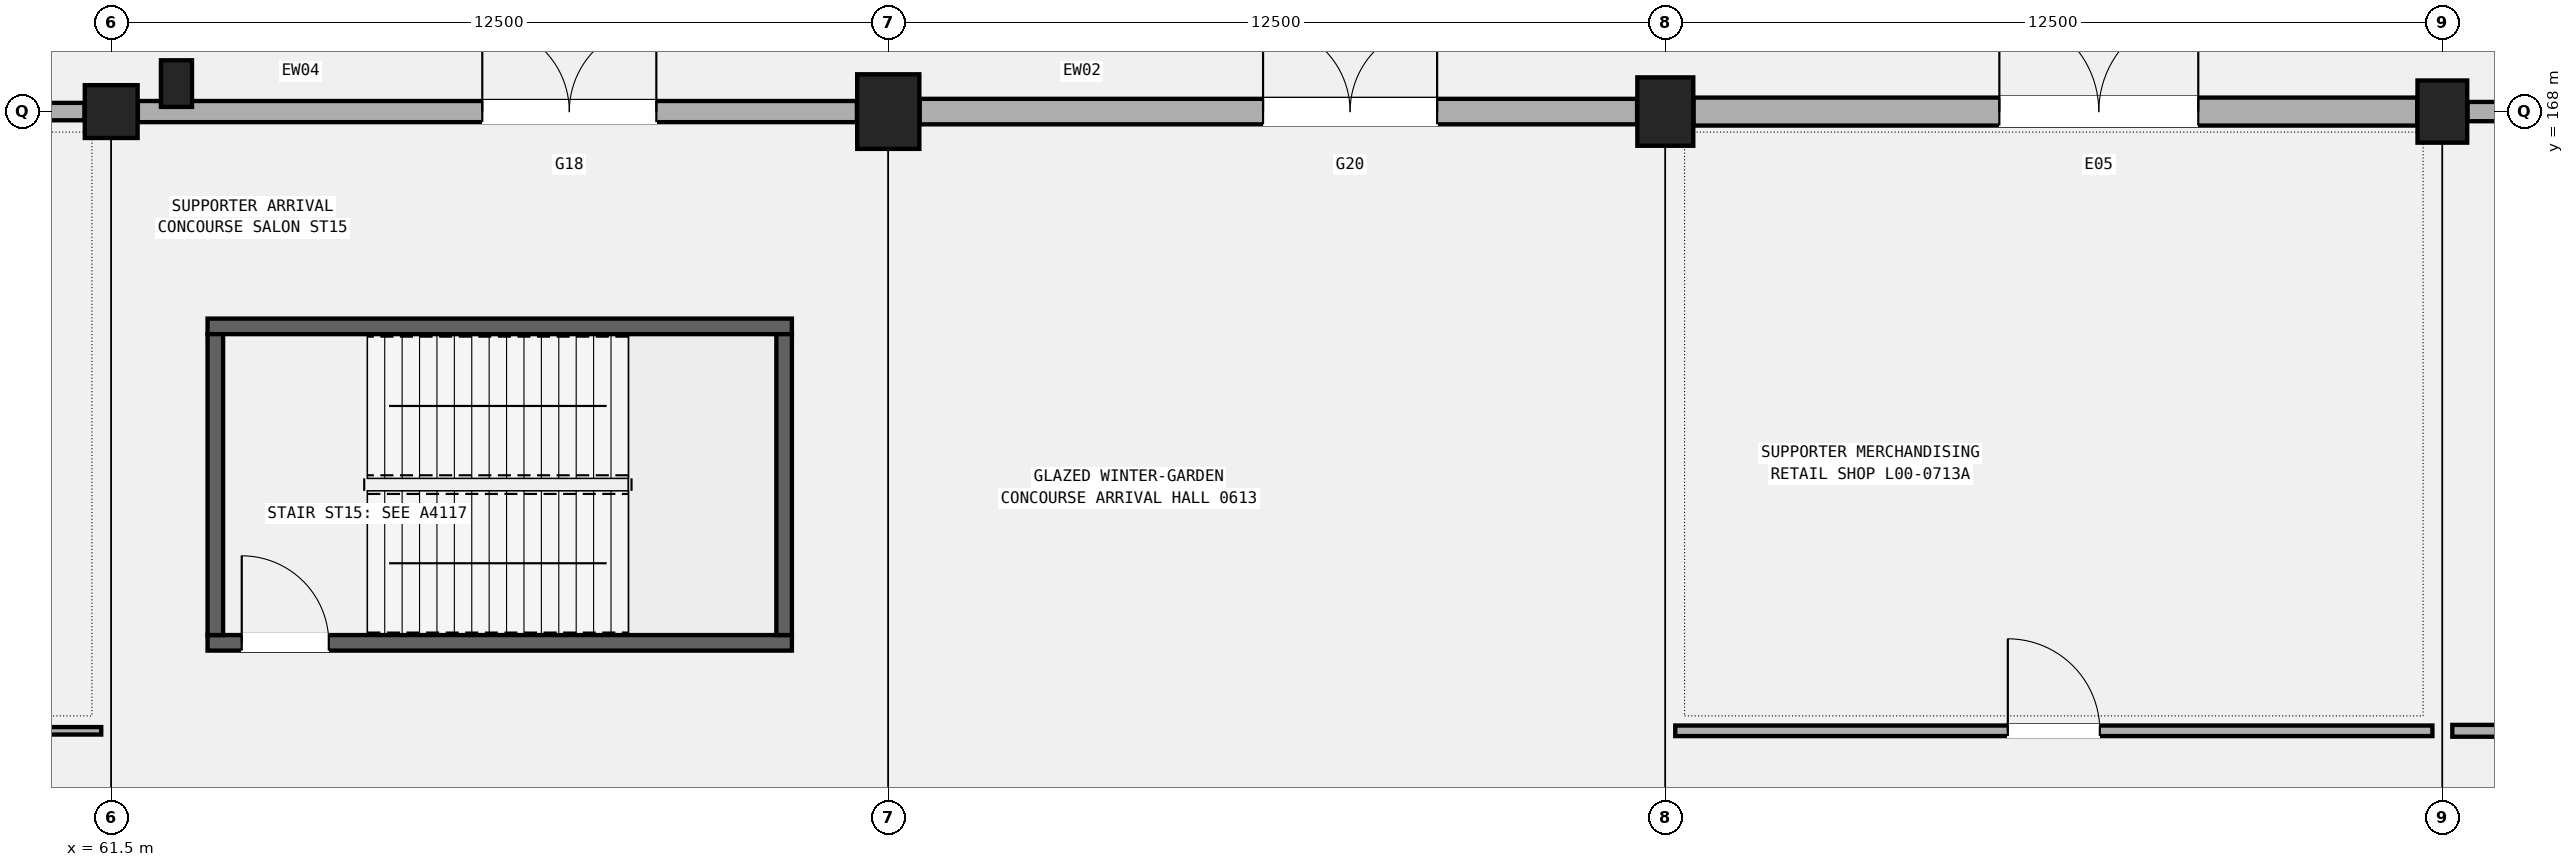
"""IFC4 building model, lengths in metres.
Left out: names, types, materials, properties, quantities, classifications, styles, units other than length and angle.
Written with IfcOpenShell. Run it as: python <this file> out.ifc"""

import sys

from ifc_helpers import new_model, si_unit, direction, frame, frame_2d, origin, origin_2d, place, context, subcontext, project, spatial, rectangle, circle, extrude, element, fill, save


model = new_model("IFC4")
c1 = context("Model", 3, precision=1e-05, world=origin(), true_north=direction((0.0, 1.0)))
c2 = subcontext(c1, "Body", "Model", "MODEL_VIEW")
j1 = project(units=[si_unit("LENGTHUNIT", "METRE"), si_unit("PLANEANGLEUNIT", "RADIAN")], contexts=[c1])
p1 = place(None, origin())
s1 = spatial("IfcSite", under=j1, at=p1, CompositionType="ELEMENT")
p2 = place(p1, origin())
s2 = spatial("IfcBuilding", under=s1, at=p2, CompositionType="ELEMENT")
p3 = place(p2, origin())
s3 = spatial("IfcBuildingStorey", under=s2, at=p3, CompositionType="ELEMENT", Elevation=0.0)
p4 = place(p3, frame((61.5, 168.0, 0.0), z_axis=(0.0, 0.0, 1.0), x_axis=(1.0, 0.0, 0.0)))
e1 = element("IfcColumn", 1, at=p4, inside=s3, PredefinedType="COLUMN", context=c2, shape_type="SweptSolid", body=[
    extrude(circle(Radius=0.425, at=origin_2d()), origin(), (0.0, 0.0, 1.0), 5.4),
])
p5 = place(p3, frame((74.0, 168.0, 0.0), z_axis=(0.0, 0.0, 1.0), x_axis=(1.0, 0.0, 0.0)))
e2 = element("IfcColumn", 2, at=p5, inside=s3, PredefinedType="COLUMN", context=c2, shape_type="SweptSolid", body=[
    extrude(rectangle(XDim=1.0, YDim=1.2, at=origin_2d()), origin(), (0.0, 0.0, 1.0), 5.4),
])
p6 = place(p3, frame((86.5, 168.0, 0.0), z_axis=(0.0, 0.0, 1.0), x_axis=(1.0, 0.0, 0.0)))
e3 = element("IfcColumn", 3, at=p6, inside=s3, PredefinedType="COLUMN", context=c2, shape_type="SweptSolid", body=[
    extrude(rectangle(XDim=0.9, YDim=1.1, at=origin_2d()), origin(), (0.0, 0.0, 1.0), 5.4),
])
p7 = place(p3, frame((99.0, 168.0, 0.0), z_axis=(0.0, 0.0, 1.0), x_axis=(1.0, 0.0, 0.0)))
e4 = element("IfcColumn", 4, at=p7, inside=s3, PredefinedType="COLUMN", context=c2, shape_type="SweptSolid", body=[
    extrude(rectangle(XDim=0.8, YDim=1.0, at=origin_2d()), origin(), (0.0, 0.0, 1.0), 5.4),
])
p8 = place(p3, frame((62.55, 168.45, 0.0), z_axis=(0.0, 0.0, 1.0), x_axis=(1.0, 0.0, 0.0)))
e5 = element("IfcColumn", 5, at=p8, inside=s3, PredefinedType="PILASTER", context=c2, shape_type="SweptSolid", body=[
    extrude(rectangle(XDim=0.5, YDim=0.75, at=origin_2d()), origin(), (0.0, 0.0, 1.0), 5.4),
])
p9 = place(p3, frame((49.404, 168.0, 0.0), z_axis=(0.0, 0.0, 1.0), x_axis=(1.0, 0.0, 0.0)))
e6 = element("IfcWall", 6, at=p9, inside=s3, PredefinedType="SOLIDWALL", context=c2, shape_type="SweptSolid", body=[
    extrude(rectangle(XDim=11.667, YDim=0.28, at=frame_2d((5.833, 0.0))), origin(), (0.0, 0.0, 1.0), 4.24),
])
p10 = place(p9, frame((5.6, 0.0, 0.0)))
e7 = element("IfcOpeningElement", 7, at=p10, cuts=e6, PredefinedType="OPENING", context=c2, shape_type="SweptSolid", body=[
    extrude(rectangle(XDim=2.8, YDim=2.4, at=frame_2d((1.4, 1.2))), frame((0.0, 0.15, 0.0), z_axis=(0.0, -1.0, 0.0), x_axis=(1.0, 0.0, 0.0)), (0.0, 0.0, 1.0), 0.3),
])
p11 = place(p3, frame((61.929, 168.0, 0.0), z_axis=(0.0, 0.0, 1.0), x_axis=(1.0, 0.0, 0.0)))
e8 = element("IfcWall", 8, at=p11, inside=s3, PredefinedType="SOLIDWALL", context=c2, shape_type="SweptSolid", body=[
    extrude(rectangle(XDim=11.567, YDim=0.34, at=frame_2d((5.784, 0.0))), origin(), (0.0, 0.0, 1.0), 4.34),
])
p12 = place(p11, frame((5.54, 0.0, 0.0)))
e9 = element("IfcOpeningElement", 9, at=p12, cuts=e8, PredefinedType="OPENING", context=c2, shape_type="SweptSolid", body=[
    extrude(rectangle(XDim=2.8, YDim=2.4, at=frame_2d((1.4, 1.2))), frame((0.0, 0.18, 0.0), z_axis=(0.0, -1.0, 0.0), x_axis=(1.0, 0.0, 0.0)), (0.0, 0.0, 1.0), 0.36),
])
p13 = place(p3, frame((74.504, 168.0, 0.0), z_axis=(0.0, 0.0, 1.0), x_axis=(1.0, 0.0, 0.0)))
e10 = element("IfcWall", 10, at=p13, inside=s3, PredefinedType="SOLIDWALL", context=c2, shape_type="SweptSolid", body=[
    extrude(rectangle(XDim=11.542, YDim=0.41, at=frame_2d((5.771, 0.0))), origin(), (0.0, 0.0, 1.0), 4.09),
])
p14 = place(p13, frame((5.525, 0.0, 0.0)))
e11 = element("IfcOpeningElement", 11, at=p14, cuts=e10, PredefinedType="OPENING", context=c2, shape_type="SweptSolid", body=[
    extrude(rectangle(XDim=2.8, YDim=2.4, at=frame_2d((1.4, 1.2))), frame((0.0, 0.215, 0.0), z_axis=(0.0, -1.0, 0.0), x_axis=(1.0, 0.0, 0.0)), (0.0, 0.0, 1.0), 0.43),
])
p15 = place(p3, frame((86.954, 168.0, 0.0), z_axis=(0.0, 0.0, 1.0), x_axis=(1.0, 0.0, 0.0)))
e12 = element("IfcWall", 12, at=p15, inside=s3, PredefinedType="SOLIDWALL", context=c2, shape_type="SweptSolid", body=[
    extrude(rectangle(XDim=11.642, YDim=0.45, at=frame_2d((5.821, 0.0))), origin(), (0.0, 0.0, 1.0), 4.24),
])
p16 = place(p15, frame((4.919, 0.0, 0.0)))
e13 = element("IfcOpeningElement", 13, at=p16, cuts=e12, PredefinedType="OPENING", context=c2, shape_type="SweptSolid", body=[
    extrude(rectangle(XDim=3.2, YDim=2.6, at=frame_2d((1.6, 1.3))), frame((0.0, 0.235, 0.0), z_axis=(0.0, -1.0, 0.0), x_axis=(1.0, 0.0, 0.0)), (0.0, 0.0, 1.0), 0.47),
])
p17 = place(p3, frame((99.404, 168.0, 0.0), z_axis=(0.0, 0.0, 1.0), x_axis=(1.0, 0.0, 0.0)))
e14 = element("IfcWall", 14, at=p17, inside=s3, PredefinedType="SOLIDWALL", context=c2, shape_type="SweptSolid", body=[
    extrude(rectangle(XDim=12.167, YDim=0.31, at=frame_2d((6.083, 0.0))), origin(), (0.0, 0.0, 1.0), 4.24),
])
p18 = place(p17, frame((5.9, 0.0, 0.0)))
e15 = element("IfcOpeningElement", 15, at=p18, cuts=e14, PredefinedType="OPENING", context=c2, shape_type="SweptSolid", body=[
    extrude(rectangle(XDim=2.8, YDim=2.4, at=frame_2d((1.4, 1.2))), frame((0.0, 0.165, 0.0), z_axis=(0.0, -1.0, 0.0), x_axis=(1.0, 0.0, 0.0)), (0.0, 0.0, 1.0), 0.33),
])
p19 = place(p3, frame((63.05, 159.455, 0.0), z_axis=(0.0, 0.0, 1.0), x_axis=(1.0, 0.0, 0.0)))
e16 = element("IfcWall", 16, at=p19, inside=s3, PredefinedType="SHEAR", context=c2, shape_type="SweptSolid", body=[
    extrude(rectangle(XDim=9.4, YDim=0.25, at=frame_2d((4.7, 0.0))), origin(), (0.0, 0.0, 1.0), 5.14),
])
p20 = place(p19, frame((0.55, 0.0, 0.0)))
e17 = element("IfcOpeningElement", 17, at=p20, cuts=e16, PredefinedType="OPENING", context=c2, shape_type="SweptSolid", body=[
    extrude(rectangle(XDim=1.4, YDim=2.15, at=frame_2d((0.7, 1.075))), frame((0.0, 0.135, 0.0), z_axis=(0.0, -1.0, 0.0), x_axis=(1.0, 0.0, 0.0)), (0.0, 0.0, 1.0), 0.27),
])
p21 = place(p3, frame((63.05, 164.545, 0.0), z_axis=(0.0, 0.0, 1.0), x_axis=(1.0, 0.0, 0.0)))
e18 = element("IfcWall", 18, at=p21, inside=s3, PredefinedType="SHEAR", context=c2, shape_type="SweptSolid", body=[
    extrude(rectangle(XDim=9.4, YDim=0.25, at=frame_2d((4.7, 0.0))), origin(), (0.0, 0.0, 1.0), 5.14),
])
for number, where, z_axis, x_axis in (
    (19, (63.175, 159.58, 0.0), (0.0, 0.0, 1.0), (0.0, 1.0, 0.0)),
    (20, (72.325, 159.58, 0.0), (0.0, 0.0, 1.0), (0.0, 1.0, 0.0)),
):
    element("IfcWall", number, at=place(p3, frame(where, z_axis=z_axis, x_axis=x_axis)), inside=s3, PredefinedType="SHEAR", context=c2, shape_type="SweptSolid", body=[
        extrude(rectangle(XDim=4.84, YDim=0.25, at=frame_2d((2.42, 0.0))), origin(), (0.0, 0.0, 1.0), 5.14),
    ])
p22 = place(p3, frame((50.97, 158.04, 0.0), z_axis=(0.0, 0.0, 1.0), x_axis=(1.0, 0.0, 0.0)))
e21 = element("IfcWall", 21, at=p22, inside=s3, PredefinedType="PARTITIONING", context=c2, shape_type="SweptSolid", body=[
    extrude(rectangle(XDim=10.37, YDim=0.12, at=frame_2d((5.185, 0.0))), origin(), (0.0, 0.0, 1.0), 4.52),
])
p23 = place(p22, frame((4.655, 0.0, 0.0)))
e22 = element("IfcOpeningElement", 22, at=p23, cuts=e21, PredefinedType="OPENING", context=c2, shape_type="SweptSolid", body=[
    extrude(rectangle(XDim=1.06, YDim=2.15, at=frame_2d((0.53, 1.075))), frame((0.0, 0.07, 0.0), z_axis=(0.0, -1.0, 0.0), x_axis=(1.0, 0.0, 0.0)), (0.0, 0.0, 1.0), 0.14),
])
p24 = place(p3, frame((86.66, 158.04, 0.0), z_axis=(0.0, 0.0, 1.0), x_axis=(1.0, 0.0, 0.0)))
e23 = element("IfcWall", 23, at=p24, inside=s3, PredefinedType="PARTITIONING", context=c2, shape_type="SweptSolid", body=[
    extrude(rectangle(XDim=12.18, YDim=0.17, at=frame_2d((6.09, 0.0))), origin(), (0.0, 0.0, 1.0), 4.52),
])
p25 = place(p24, frame((5.35, 0.0, 0.0)))
e24 = element("IfcOpeningElement", 24, at=p25, cuts=e23, PredefinedType="OPENING", context=c2, shape_type="SweptSolid", body=[
    extrude(rectangle(XDim=1.48, YDim=2.24, at=frame_2d((0.74, 1.12))), frame((0.0, 0.095, 0.0), z_axis=(0.0, -1.0, 0.0), x_axis=(1.0, 0.0, 0.0)), (0.0, 0.0, 1.0), 0.19),
])
p26 = place(p3, frame((99.16, 158.04, 0.0), z_axis=(0.0, 0.0, 1.0), x_axis=(1.0, 0.0, 0.0)))
e25 = element("IfcWall", 25, at=p26, inside=s3, PredefinedType="PARTITIONING", context=c2, shape_type="SweptSolid", body=[
    extrude(rectangle(XDim=12.68, YDim=0.19, at=frame_2d((6.34, 0.0))), origin(), (0.0, 0.0, 1.0), 4.52),
])
p27 = place(p26, frame((5.89, 0.0, 0.0)))
e26 = element("IfcOpeningElement", 26, at=p27, cuts=e25, PredefinedType="OPENING", context=c2, shape_type="SweptSolid", body=[
    extrude(rectangle(XDim=0.9, YDim=2.06, at=frame_2d((0.45, 1.03))), frame((0.0, 0.105, 0.0), z_axis=(0.0, -1.0, 0.0), x_axis=(1.0, 0.0, 0.0)), (0.0, 0.0, 1.0), 0.21),
])
p28 = place(p12, origin())
e27 = element("IfcDoor", 27, at=p28, inside=s3, OperationType="DOUBLE_DOOR_SINGLE_SWING", PredefinedType="DOOR", context=c2, shape_type="SweptSolid", body=[
    extrude(rectangle(XDim=2.8, YDim=2.4, at=frame_2d((1.4, 1.2))), frame((0.0, 0.025, 0.0), z_axis=(0.0, -1.0, 0.0), x_axis=(1.0, 0.0, 0.0)), (0.0, 0.0, 1.0), 0.05),
])
fill(e9, e27)
p29 = place(p14, origin())
e28 = element("IfcDoor", 28, at=p29, inside=s3, OperationType="DOUBLE_DOOR_SINGLE_SWING", PredefinedType="DOOR", context=c2, shape_type="SweptSolid", body=[
    extrude(rectangle(XDim=2.8, YDim=2.4, at=frame_2d((1.4, 1.2))), frame((0.0, 0.025, 0.0), z_axis=(0.0, -1.0, 0.0), x_axis=(1.0, 0.0, 0.0)), (0.0, 0.0, 1.0), 0.05),
])
fill(e11, e28)
p30 = place(p16, origin())
e29 = element("IfcDoor", 29, at=p30, inside=s3, OperationType="DOUBLE_DOOR_SINGLE_SWING", PredefinedType="DOOR", context=c2, shape_type="SweptSolid", body=[
    extrude(rectangle(XDim=3.2, YDim=2.6, at=frame_2d((1.6, 1.3))), frame((0.0, 0.025, 0.0), z_axis=(0.0, -1.0, 0.0), x_axis=(1.0, 0.0, 0.0)), (0.0, 0.0, 1.0), 0.05),
])
fill(e13, e29)
p31 = place(p20, origin())
e30 = element("IfcDoor", 30, at=p31, inside=s3, OperationType="SINGLE_SWING_LEFT", PredefinedType="DOOR", context=c2, shape_type="SweptSolid", body=[
    extrude(rectangle(XDim=1.4, YDim=2.15, at=frame_2d((0.7, 1.075))), frame((0.0, 0.025, 0.0), z_axis=(0.0, -1.0, 0.0), x_axis=(1.0, 0.0, 0.0)), (0.0, 0.0, 1.0), 0.05),
])
fill(e17, e30)
p32 = place(p25, origin())
e31 = element("IfcDoor", 31, at=p32, inside=s3, OperationType="SINGLE_SWING_LEFT", PredefinedType="DOOR", context=c2, shape_type="SweptSolid", body=[
    extrude(rectangle(XDim=1.48, YDim=2.24, at=frame_2d((0.74, 1.12))), frame((0.0, 0.025, 0.0), z_axis=(0.0, -1.0, 0.0), x_axis=(1.0, 0.0, 0.0)), (0.0, 0.0, 1.0), 0.05),
])
fill(e24, e31)
save(model, sys.argv[1])
